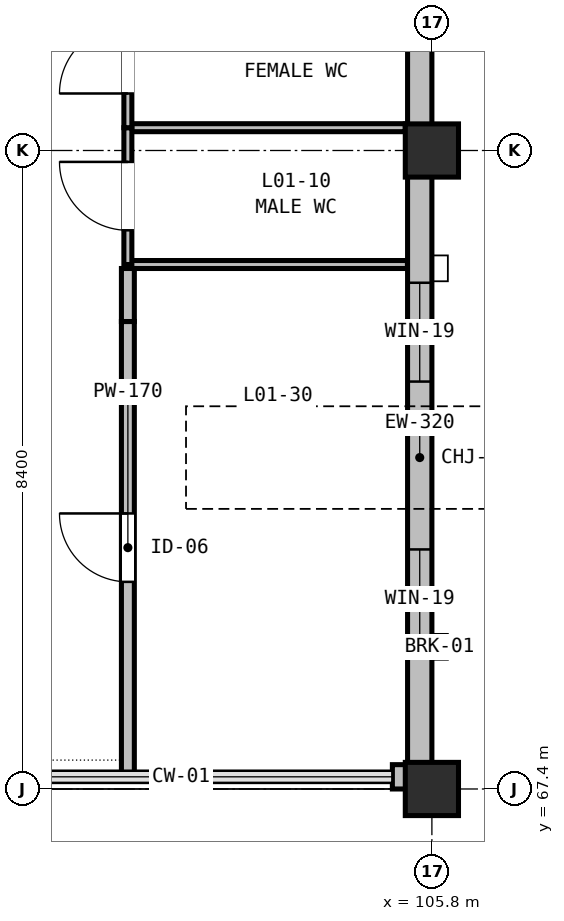
"""IFC4 building model, lengths in metres.
Left out: names, types, materials, properties, quantities, classifications, styles, units other than length and angle.
Written with IfcOpenShell. Run it as: python <this file> out.ifc"""

import sys

from ifc_helpers import new_model, si_unit, direction, frame, frame_2d, origin, origin_2d, place, context, subcontext, project, spatial, rectangle, extrude, element, fill, save


model = new_model("IFC4")
c1 = context("Model", 3, precision=1e-05, world=origin(), true_north=direction((0.0, 1.0)))
c2 = subcontext(c1, "Body", "Model", "MODEL_VIEW")
j1 = project(units=[si_unit("LENGTHUNIT", "METRE"), si_unit("PLANEANGLEUNIT", "RADIAN")], contexts=[c1])
p1 = place(None, origin())
s1 = spatial("IfcSite", under=j1, at=p1, CompositionType="ELEMENT")
p2 = place(p1, origin())
s2 = spatial("IfcBuilding", under=s1, at=p2, CompositionType="ELEMENT")
p3 = place(p2, frame((0.0, 0.0, 5.4)))
s3 = spatial("IfcBuildingStorey", under=s2, at=p3, CompositionType="ELEMENT", Elevation=5.4)
p4 = place(p3, frame((105.8, 67.4, 0.0), z_axis=(0.0, 0.0, 1.0), x_axis=(1.0, 0.0, 0.0)))
e1 = element("IfcColumn", 1, at=p4, inside=s3, PredefinedType="COLUMN", context=c2, shape_type="SweptSolid", body=[
    extrude(rectangle(XDim=0.7, YDim=0.7, at=origin_2d()), origin(), (0.0, 0.0, 1.0), 4.74),
])
p5 = place(p3, frame((105.8, 75.8, 0.0), z_axis=(0.0, 0.0, 1.0), x_axis=(1.0, 0.0, 0.0)))
e2 = element("IfcColumn", 2, at=p5, inside=s3, PredefinedType="COLUMN", context=c2, shape_type="SweptSolid", body=[
    extrude(rectangle(XDim=0.7, YDim=0.7, at=origin_2d()), origin(), (0.0, 0.0, 1.0), 4.8),
])
p6 = place(p3, frame((105.64, 83.88, 0.0), z_axis=(0.0, 0.0, 1.0), x_axis=(0.0, -1.0, 0.0)))
e3 = element("IfcWall", 3, at=p6, inside=s3, PredefinedType="STANDARD", context=c2, shape_type="SweptSolid", body=[
    extrude(rectangle(XDim=8.08, YDim=0.32, at=frame_2d((4.04, 0.0))), origin(), (0.0, 0.0, 1.0), 3.935),
])
p7 = place(p6, frame((1.007, 0.0, 0.9)))
e4 = element("IfcOpeningElement", 4, at=p7, cuts=e3, PredefinedType="OPENING", context=c2, shape_type="SweptSolid", body=[
    extrude(rectangle(XDim=2.35, YDim=1.5, at=frame_2d((1.175, 0.75))), frame((0.0, 0.17, 0.0), z_axis=(0.0, -1.0, 0.0), x_axis=(1.0, 0.0, 0.0)), (0.0, 0.0, 1.0), 0.34),
])
p8 = place(p3, frame((105.64, 75.8, 0.0), z_axis=(0.0, 0.0, 1.0), x_axis=(0.0, -1.0, 0.0)))
e5 = element("IfcWall", 5, at=p8, inside=s3, PredefinedType="STANDARD", context=c2, shape_type="SweptSolid", body=[
    extrude(rectangle(XDim=8.08, YDim=0.32, at=frame_2d((4.04, 0.0))), origin(), (0.0, 0.0, 1.0), 3.935),
])
p9 = place(p8, frame((1.74, 0.0, 0.75)))
e6 = element("IfcOpeningElement", 6, at=p9, cuts=e5, PredefinedType="OPENING", context=c2, shape_type="SweptSolid", body=[
    extrude(rectangle(XDim=1.3, YDim=2.4, at=frame_2d((0.65, 1.2))), frame((0.0, 0.17, 0.0), z_axis=(0.0, -1.0, 0.0), x_axis=(1.0, 0.0, 0.0)), (0.0, 0.0, 1.0), 0.34),
])
p10 = place(p8, frame((5.248, 0.0, 0.75)))
e7 = element("IfcOpeningElement", 7, at=p10, cuts=e5, PredefinedType="OPENING", context=c2, shape_type="SweptSolid", body=[
    extrude(rectangle(XDim=1.3, YDim=2.4, at=frame_2d((0.65, 1.2))), frame((0.0, 0.17, 0.0), z_axis=(0.0, -1.0, 0.0), x_axis=(1.0, 0.0, 0.0)), (0.0, 0.0, 1.0), 0.34),
])
p11 = place(p3, frame((105.8, 67.56, 0.0), z_axis=(0.0, 0.0, 1.0), x_axis=(-1.0, 0.0, 0.0)))
e8 = element("IfcWall", 8, at=p11, inside=s3, PredefinedType="STANDARD", context=c2, shape_type="SweptSolid", body=[
    extrude(rectangle(XDim=0.52, YDim=0.32, at=frame_2d((0.26, 0.0))), origin(), (0.0, 0.0, 1.0), 3.935),
])
p12 = place(p3, frame((101.8, 76.1, 0.0), z_axis=(0.0, 0.0, 1.0), x_axis=(1.0, 0.0, 0.0)))
e9 = element("IfcWall", 9, at=p12, inside=s3, PredefinedType="PARTITIONING", context=c2, shape_type="SweptSolid", body=[
    extrude(rectangle(XDim=3.65, YDim=0.105, at=frame_2d((1.825, 0.0))), origin(), (0.0, 0.0, 1.0), 4.135),
])
p13 = place(p3, frame((105.478, 74.3, 0.0), z_axis=(0.0, 0.0, 1.0), x_axis=(-1.0, 0.0, 0.0)))
e10 = element("IfcWall", 10, at=p13, inside=s3, PredefinedType="PARTITIONING", context=c2, shape_type="SweptSolid", body=[
    extrude(rectangle(XDim=3.678, YDim=0.105, at=frame_2d((1.839, 0.0))), origin(), (0.0, 0.0, 1.0), 3.935),
])
p14 = place(p3, frame((101.8, 74.3, 0.0), z_axis=(0.0, 0.0, 1.0), x_axis=(0.0, 1.0, 0.0)))
e11 = element("IfcWall", 11, at=p14, inside=s3, PredefinedType="PARTITIONING", context=c2, shape_type="SweptSolid", body=[
    extrude(rectangle(XDim=1.8, YDim=0.105, at=frame_2d((0.9, 0.0))), origin(), (0.0, 0.0, 1.0), 4.135),
])
p15 = place(p14, frame((0.45, 0.0, 0.0)))
e12 = element("IfcOpeningElement", 12, at=p15, cuts=e11, PredefinedType="OPENING", context=c2, shape_type="SweptSolid", body=[
    extrude(rectangle(XDim=0.9, YDim=2.02, at=frame_2d((0.45, 1.01))), frame((0.0, 0.062, 0.0), z_axis=(0.0, -1.0, 0.0), x_axis=(1.0, 0.0, 0.0)), (0.0, 0.0, 1.0), 0.125),
])
p16 = place(p3, frame((101.8, 76.1, 0.0), z_axis=(0.0, 0.0, 1.0), x_axis=(0.0, 1.0, 0.0)))
e13 = element("IfcWall", 13, at=p16, inside=s3, PredefinedType="PARTITIONING", context=c2, shape_type="SweptSolid", body=[
    extrude(rectangle(XDim=1.8, YDim=0.105, at=frame_2d((0.9, 0.0))), origin(), (0.0, 0.0, 1.0), 4.135),
])
p17 = place(p16, frame((0.45, 0.0, 0.0)))
e14 = element("IfcOpeningElement", 14, at=p17, cuts=e13, PredefinedType="OPENING", context=c2, shape_type="SweptSolid", body=[
    extrude(rectangle(XDim=0.9, YDim=2.02, at=frame_2d((0.45, 1.01))), frame((0.0, 0.062, 0.0), z_axis=(0.0, -1.0, 0.0), x_axis=(1.0, 0.0, 0.0)), (0.0, 0.0, 1.0), 0.125),
])
p18 = place(p3, frame((101.8, 67.6, 0.0), z_axis=(0.0, 0.0, 1.0), x_axis=(0.0, 1.0, 0.0)))
e15 = element("IfcWall", 15, at=p18, inside=s3, PredefinedType="PARTITIONING", context=c2, shape_type="SweptSolid", body=[
    extrude(rectangle(XDim=5.95, YDim=0.17, at=frame_2d((2.975, 0.0))), origin(), (0.0, 0.0, 1.0), 4.085),
])
p19 = place(p18, frame((2.525, 0.0, 0.0)))
e16 = element("IfcOpeningElement", 16, at=p19, cuts=e15, PredefinedType="OPENING", context=c2, shape_type="SweptSolid", body=[
    extrude(rectangle(XDim=0.9, YDim=2.06, at=frame_2d((0.45, 1.03))), frame((0.0, 0.095, 0.0), z_axis=(0.0, -1.0, 0.0), x_axis=(1.0, 0.0, 0.0)), (0.0, 0.0, 1.0), 0.19),
])
p20 = place(p3, frame((101.8, 73.55, 0.0), z_axis=(0.0, 0.0, 1.0), x_axis=(0.0, 1.0, 0.0)))
e17 = element("IfcWall", 17, at=p20, inside=s3, PredefinedType="PARTITIONING", context=c2, shape_type="SweptSolid", body=[
    extrude(rectangle(XDim=0.698, YDim=0.17, at=frame_2d((0.349, 0.0))), origin(), (0.0, 0.0, 1.0), 4.445),
])
p21 = place(p9, origin())
e18 = element("IfcWindow", 18, at=p21, inside=s3, PartitioningType="SINGLE_PANEL", PredefinedType="WINDOW", context=c2, shape_type="SweptSolid", body=[
    extrude(rectangle(XDim=1.3, YDim=2.4, at=frame_2d((0.65, 1.2))), frame((0.0, 0.03, 0.0), z_axis=(0.0, -1.0, 0.0), x_axis=(1.0, 0.0, 0.0)), (0.0, 0.0, 1.0), 0.06),
])
fill(e6, e18)
p22 = place(p10, origin())
e19 = element("IfcWindow", 19, at=p22, inside=s3, PartitioningType="SINGLE_PANEL", PredefinedType="WINDOW", context=c2, shape_type="SweptSolid", body=[
    extrude(rectangle(XDim=1.3, YDim=2.4, at=frame_2d((0.65, 1.2))), frame((0.0, 0.03, 0.0), z_axis=(0.0, -1.0, 0.0), x_axis=(1.0, 0.0, 0.0)), (0.0, 0.0, 1.0), 0.06),
])
fill(e7, e19)
p23 = place(p15, origin())
e20 = element("IfcDoor", 20, at=p23, inside=s3, OperationType="SINGLE_SWING_RIGHT", PredefinedType="DOOR", context=c2, shape_type="SweptSolid", body=[
    extrude(rectangle(XDim=0.9, YDim=2.02, at=frame_2d((0.45, 1.01))), frame((0.0, 0.025, 0.0), z_axis=(0.0, -1.0, 0.0), x_axis=(1.0, 0.0, 0.0)), (0.0, 0.0, 1.0), 0.05),
])
fill(e12, e20)
p24 = place(p17, origin())
e21 = element("IfcDoor", 21, at=p24, inside=s3, OperationType="SINGLE_SWING_LEFT", PredefinedType="DOOR", context=c2, shape_type="SweptSolid", body=[
    extrude(rectangle(XDim=0.9, YDim=2.02, at=frame_2d((0.45, 1.01))), frame((0.0, 0.025, 0.0), z_axis=(0.0, -1.0, 0.0), x_axis=(1.0, 0.0, 0.0)), (0.0, 0.0, 1.0), 0.05),
])
fill(e14, e21)
p25 = place(p19, origin())
e22 = element("IfcDoor", 22, at=p25, inside=s3, OperationType="SINGLE_SWING_RIGHT", PredefinedType="DOOR", context=c2, shape_type="SweptSolid", body=[
    extrude(rectangle(XDim=0.9, YDim=2.06, at=frame_2d((0.45, 1.03))), frame((0.0, 0.025, 0.0), z_axis=(0.0, -1.0, 0.0), x_axis=(1.0, 0.0, 0.0)), (0.0, 0.0, 1.0), 0.05),
])
fill(e16, e22)
save(model, sys.argv[1])
